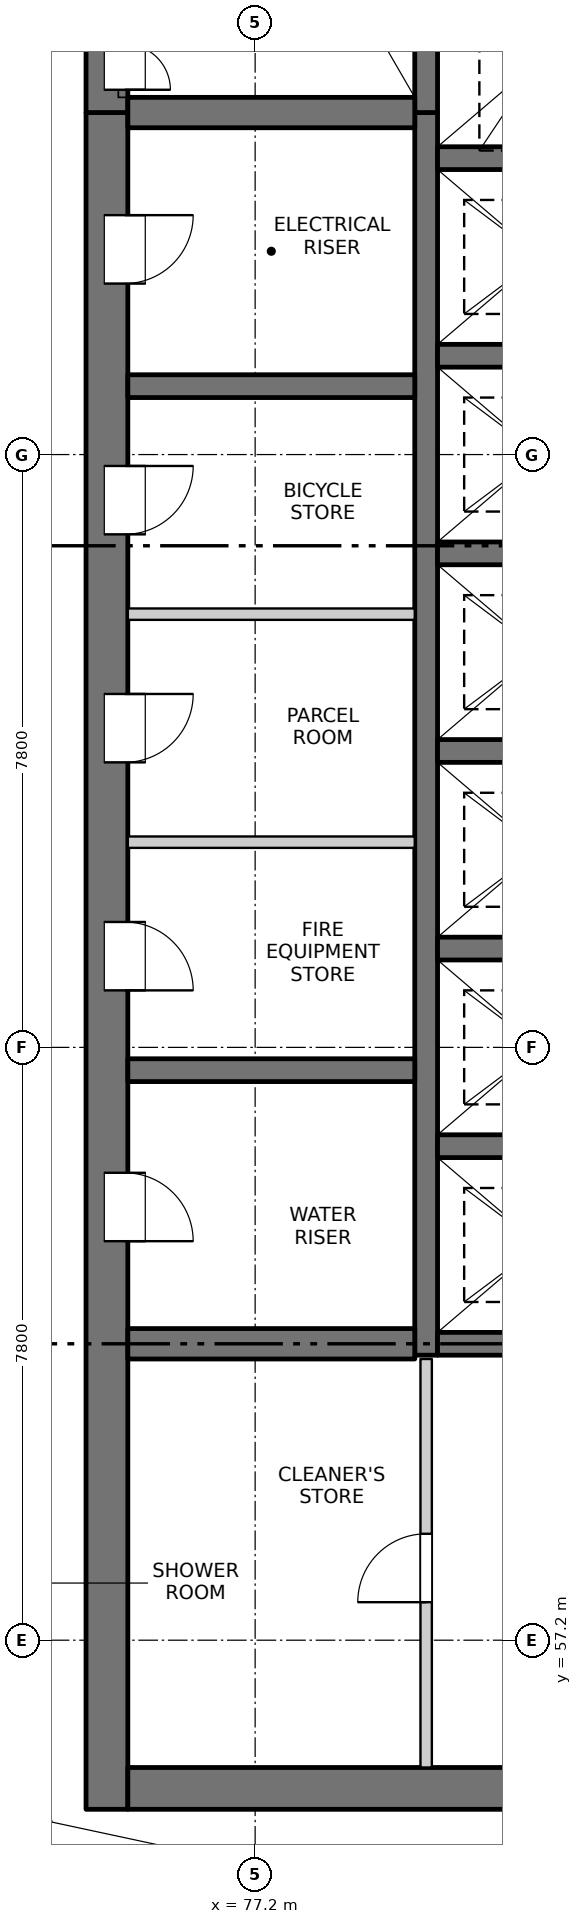
"""IFC4 building model, lengths in metres.
Left out: names, types, materials, properties, quantities, classifications, styles, units other than length and angle.
Written with IfcOpenShell. Run it as: python <this file> out.ifc"""

import sys

from ifc_helpers import new_model, si_unit, direction, frame, frame_2d, origin, place, context, subcontext, project, spatial, rectangle, extrude, element, fill, save


model = new_model("IFC4")
c1 = context("Model", 3, precision=1e-05, world=origin(), true_north=direction((0.0, 1.0)))
c2 = subcontext(c1, "Body", "Model", "MODEL_VIEW")
j1 = project(units=[si_unit("LENGTHUNIT", "METRE"), si_unit("PLANEANGLEUNIT", "RADIAN")], contexts=[c1])
p1 = place(None, origin())
s1 = spatial("IfcSite", under=j1, at=p1, CompositionType="ELEMENT")
p2 = place(p1, origin())
s2 = spatial("IfcBuilding", under=s1, at=p2, CompositionType="ELEMENT")
p3 = place(p2, frame((0.0, 0.0, 99.9)))
s3 = spatial("IfcBuildingStorey", under=s2, at=p3, CompositionType="ELEMENT", Elevation=99.9)
p4 = place(p3, frame((75.25, 54.975, -0.3), z_axis=(0.0, 0.0, 1.0), x_axis=(0.0, 1.0, 0.0)))
e1 = element("IfcWall", 1, at=p4, inside=s3, PredefinedType="SOLIDWALL", context=c2, shape_type="SweptSolid", body=[
    extrude(rectangle(XDim=22.325, YDim=0.55, at=frame_2d((11.163, 0.0))), origin(), (0.0, 0.0, 1.0), 3.45),
])
p5 = place(p4, frame((7.475, 0.0, 0.3)))
e2 = element("IfcOpeningElement", 2, at=p5, cuts=e1, PredefinedType="OPENING", context=c2, shape_type="SweptSolid", body=[
    extrude(rectangle(XDim=0.9, YDim=2.1, at=frame_2d((0.45, 1.05))), frame((0.0, 0.285, 0.0), z_axis=(0.0, -1.0, 0.0), x_axis=(1.0, 0.0, 0.0)), (0.0, 0.0, 1.0), 0.57),
])
p6 = place(p4, frame((10.775, 0.0, 0.3)))
e3 = element("IfcOpeningElement", 3, at=p6, cuts=e1, PredefinedType="OPENING", context=c2, shape_type="SweptSolid", body=[
    extrude(rectangle(XDim=0.9, YDim=2.1, at=frame_2d((0.45, 1.05))), frame((0.0, 0.285, 0.0), z_axis=(0.0, -1.0, 0.0), x_axis=(1.0, 0.0, 0.0)), (0.0, 0.0, 1.0), 0.57),
])
p7 = place(p4, frame((13.775, 0.0, 0.3)))
e4 = element("IfcOpeningElement", 4, at=p7, cuts=e1, PredefinedType="OPENING", context=c2, shape_type="SweptSolid", body=[
    extrude(rectangle(XDim=0.9, YDim=2.1, at=frame_2d((0.45, 1.05))), frame((0.0, 0.285, 0.0), z_axis=(0.0, -1.0, 0.0), x_axis=(1.0, 0.0, 0.0)), (0.0, 0.0, 1.0), 0.57),
])
p8 = place(p4, frame((16.775, 0.0, 0.3)))
e5 = element("IfcOpeningElement", 5, at=p8, cuts=e1, PredefinedType="OPENING", context=c2, shape_type="SweptSolid", body=[
    extrude(rectangle(XDim=0.9, YDim=2.1, at=frame_2d((0.45, 1.05))), frame((0.0, 0.285, 0.0), z_axis=(0.0, -1.0, 0.0), x_axis=(1.0, 0.0, 0.0)), (0.0, 0.0, 1.0), 0.57),
])
p9 = place(p4, frame((20.075, 0.0, 0.3)))
e6 = element("IfcOpeningElement", 6, at=p9, cuts=e1, PredefinedType="OPENING", context=c2, shape_type="SweptSolid", body=[
    extrude(rectangle(XDim=0.9, YDim=2.1, at=frame_2d((0.45, 1.05))), frame((0.0, 0.285, 0.0), z_axis=(0.0, -1.0, 0.0), x_axis=(1.0, 0.0, 0.0)), (0.0, 0.0, 1.0), 0.57),
])
p10 = place(p3, frame((75.25, 77.3, -0.3), z_axis=(0.0, 0.0, 1.0), x_axis=(0.0, 1.0, 0.0)))
e7 = element("IfcWall", 7, at=p10, inside=s3, PredefinedType="SOLIDWALL", context=c2, shape_type="SweptSolid", body=[
    extrude(rectangle(XDim=7.475, YDim=0.55, at=frame_2d((3.737, 0.0))), origin(), (0.0, 0.0, 1.0), 3.45),
])
p11 = place(p10, frame((0.3, 0.0, 0.3)))
e8 = element("IfcOpeningElement", 8, at=p11, cuts=e7, PredefinedType="OPENING", context=c2, shape_type="SweptSolid", body=[
    extrude(rectangle(XDim=1.2, YDim=2.1, at=frame_2d((0.6, 1.05))), frame((0.0, 0.285, 0.0), z_axis=(0.0, -1.0, 0.0), x_axis=(1.0, 0.0, 0.0)), (0.0, 0.0, 1.0), 0.57),
])
p12 = place(p3, frame((75.525, 55.25, -0.3), z_axis=(0.0, 0.0, 1.0), x_axis=(1.0, 0.0, 0.0)))
e9 = element("IfcWall", 9, at=p12, inside=s3, PredefinedType="SOLIDWALL", context=c2, shape_type="SweptSolid", body=[
    extrude(rectangle(XDim=18.95, YDim=0.55, at=frame_2d((9.475, 0.0))), origin(), (0.0, 0.0, 1.0), 3.45),
])
p13 = place(p12, frame((8.725, 0.0, 0.3)))
e10 = element("IfcOpeningElement", 10, at=p13, cuts=e9, PredefinedType="OPENING", context=c2, shape_type="SweptSolid", body=[
    extrude(rectangle(XDim=1.5, YDim=2.1, at=frame_2d((0.75, 1.05))), frame((0.0, 0.285, 0.0), z_axis=(0.0, -1.0, 0.0), x_axis=(1.0, 0.0, 0.0)), (0.0, 0.0, 1.0), 0.57),
])
p14 = place(p3, frame((79.45, 60.95, -0.3), z_axis=(0.0, 0.0, 1.0), x_axis=(0.0, 1.0, 0.0)))
e11 = element("IfcWall", 11, at=p14, inside=s3, PredefinedType="SOLIDWALL", context=c2, shape_type="SweptSolid", body=[
    extrude(rectangle(XDim=16.35, YDim=0.3, at=frame_2d((8.175, 0.0))), origin(), (0.0, 0.0, 1.0), 3.45),
])
p15 = place(p3, frame((79.45, 77.3, -0.3), z_axis=(0.0, 0.0, 1.0), x_axis=(0.0, 1.0, 0.0)))
e12 = element("IfcWall", 12, at=p15, inside=s3, PredefinedType="SOLIDWALL", context=c2, shape_type="SweptSolid", body=[
    extrude(rectangle(XDim=6.925, YDim=0.3, at=frame_2d((3.462, 0.0))), origin(), (0.0, 0.0, 1.0), 3.45),
])
for number, where, z_axis, x_axis in (
    (13, (79.6, 61.1, -0.3), (0.0, 0.0, 1.0), (1.0, 0.0, 0.0)),
    (14, (79.6, 63.7, -0.3), (0.0, 0.0, 1.0), (1.0, 0.0, 0.0)),
    (15, (79.6, 66.3, -0.3), (0.0, 0.0, 1.0), (1.0, 0.0, 0.0)),
    (16, (79.6, 68.9, -0.3), (0.0, 0.0, 1.0), (1.0, 0.0, 0.0)),
    (17, (79.6, 71.5, -0.3), (0.0, 0.0, 1.0), (1.0, 0.0, 0.0)),
    (18, (79.6, 74.1, -0.3), (0.0, 0.0, 1.0), (1.0, 0.0, 0.0)),
    (19, (79.6, 76.7, -0.3), (0.0, 0.0, 1.0), (1.0, 0.0, 0.0)),
):
    element("IfcWall", number, at=place(p3, frame(where, z_axis=z_axis, x_axis=x_axis)), inside=s3, PredefinedType="SOLIDWALL", context=c2, shape_type="SweptSolid", body=[
        extrude(rectangle(XDim=3.0, YDim=0.3, at=frame_2d((1.5, 0.0))), origin(), (0.0, 0.0, 1.0), 3.45),
    ])
p16 = place(p3, frame((75.525, 61.1, -0.3), z_axis=(0.0, 0.0, 1.0), x_axis=(1.0, 0.0, 0.0)))
e20 = element("IfcWall", 20, at=p16, inside=s3, PredefinedType="SOLIDWALL", context=c2, shape_type="SweptSolid", body=[
    extrude(rectangle(XDim=3.775, YDim=0.4, at=frame_2d((1.888, 0.0))), origin(), (0.0, 0.0, 1.0), 3.45),
])
for number, where, z_axis, x_axis in (
    (21, (75.525, 64.7, -0.3), (0.0, 0.0, 1.0), (1.0, 0.0, 0.0)),
    (22, (75.525, 73.7, -0.3), (0.0, 0.0, 1.0), (1.0, 0.0, 0.0)),
):
    element("IfcWall", number, at=place(p3, frame(where, z_axis=z_axis, x_axis=x_axis)), inside=s3, PredefinedType="SOLIDWALL", context=c2, shape_type="SweptSolid", body=[
        extrude(rectangle(XDim=3.775, YDim=0.3, at=frame_2d((1.888, 0.0))), origin(), (0.0, 0.0, 1.0), 3.45),
    ])
p17 = place(p3, frame((75.525, 77.3, -0.3), z_axis=(0.0, 0.0, 1.0), x_axis=(1.0, 0.0, 0.0)))
e23 = element("IfcWall", 23, at=p17, inside=s3, PredefinedType="SOLIDWALL", context=c2, shape_type="SweptSolid", body=[
    extrude(rectangle(XDim=3.775, YDim=0.4, at=frame_2d((1.888, 0.0))), origin(), (0.0, 0.0, 1.0), 3.45),
])
for number, where, z_axis, x_axis in (
    (24, (75.525, 67.7, 0.0), (0.0, 0.0, 1.0), (1.0, 0.0, 0.0)),
    (25, (75.525, 70.7, 0.0), (0.0, 0.0, 1.0), (1.0, 0.0, 0.0)),
):
    element("IfcWall", number, at=place(p3, frame(where, z_axis=z_axis, x_axis=x_axis)), inside=s3, PredefinedType="PARTITIONING", context=c2, shape_type="SweptSolid", body=[
        extrude(rectangle(XDim=3.775, YDim=0.15, at=frame_2d((1.887, 0.0))), origin(), (0.0, 0.0, 1.0), 3.15),
    ])
p18 = place(p3, frame((79.45, 55.525, 0.0), z_axis=(0.0, 0.0, 1.0), x_axis=(0.0, 1.0, 0.0)))
e26 = element("IfcWall", 26, at=p18, inside=s3, PredefinedType="PARTITIONING", context=c2, shape_type="SweptSolid", body=[
    extrude(rectangle(XDim=5.375, YDim=0.15, at=frame_2d((2.688, 0.0))), origin(), (0.0, 0.0, 1.0), 3.15),
])
p19 = place(p18, frame((2.175, 0.0, 0.0)))
e27 = element("IfcOpeningElement", 27, at=p19, cuts=e26, PredefinedType="OPENING", context=c2, shape_type="SweptSolid", body=[
    extrude(rectangle(XDim=0.9, YDim=2.1, at=frame_2d((0.45, 1.05))), frame((0.0, 0.085, 0.0), z_axis=(0.0, -1.0, 0.0), x_axis=(1.0, 0.0, 0.0)), (0.0, 0.0, 1.0), 0.17),
])
p20 = place(p19, origin())
e28 = element("IfcDoor", 28, at=p20, inside=s3, OperationType="SINGLE_SWING_LEFT", PredefinedType="DOOR", context=c2, shape_type="SweptSolid", body=[
    extrude(rectangle(XDim=0.9, YDim=2.1, at=frame_2d((0.45, 1.05))), frame((0.0, 0.025, 0.0), z_axis=(0.0, -1.0, 0.0), x_axis=(1.0, 0.0, 0.0)), (0.0, 0.0, 1.0), 0.05),
])
fill(e27, e28)
p21 = place(p5, origin())
e29 = element("IfcDoor", 29, at=p21, inside=s3, OperationType="SINGLE_SWING_RIGHT", PredefinedType="DOOR", context=c2, shape_type="SweptSolid", body=[
    extrude(rectangle(XDim=0.9, YDim=2.1, at=frame_2d((0.45, 1.05))), frame((0.0, -0.21, 0.0), z_axis=(0.0, -1.0, 0.0), x_axis=(1.0, 0.0, 0.0)), (0.0, 0.0, 1.0), 0.05),
])
fill(e2, e29)
p22 = place(p6, origin())
e30 = element("IfcDoor", 30, at=p22, inside=s3, OperationType="SINGLE_SWING_RIGHT", PredefinedType="DOOR", context=c2, shape_type="SweptSolid", body=[
    extrude(rectangle(XDim=0.9, YDim=2.1, at=frame_2d((0.45, 1.05))), frame((0.0, -0.21, 0.0), z_axis=(0.0, -1.0, 0.0), x_axis=(1.0, 0.0, 0.0)), (0.0, 0.0, 1.0), 0.05),
])
fill(e3, e30)
p23 = place(p7, origin())
e31 = element("IfcDoor", 31, at=p23, inside=s3, OperationType="SINGLE_SWING_LEFT", PredefinedType="DOOR", context=c2, shape_type="SweptSolid", body=[
    extrude(rectangle(XDim=0.9, YDim=2.1, at=frame_2d((0.45, 1.05))), frame((0.0, -0.21, 0.0), z_axis=(0.0, -1.0, 0.0), x_axis=(1.0, 0.0, 0.0)), (0.0, 0.0, 1.0), 0.05),
])
fill(e4, e31)
p24 = place(p8, origin())
e32 = element("IfcDoor", 32, at=p24, inside=s3, OperationType="SINGLE_SWING_LEFT", PredefinedType="DOOR", context=c2, shape_type="SweptSolid", body=[
    extrude(rectangle(XDim=0.9, YDim=2.1, at=frame_2d((0.45, 1.05))), frame((0.0, -0.21, 0.0), z_axis=(0.0, -1.0, 0.0), x_axis=(1.0, 0.0, 0.0)), (0.0, 0.0, 1.0), 0.05),
])
fill(e5, e32)
p25 = place(p9, origin())
e33 = element("IfcDoor", 33, at=p25, inside=s3, OperationType="SINGLE_SWING_LEFT", PredefinedType="DOOR", context=c2, shape_type="SweptSolid", body=[
    extrude(rectangle(XDim=0.9, YDim=2.1, at=frame_2d((0.45, 1.05))), frame((0.0, -0.21, 0.0), z_axis=(0.0, -1.0, 0.0), x_axis=(1.0, 0.0, 0.0)), (0.0, 0.0, 1.0), 0.05),
])
fill(e6, e33)
p26 = place(p11, origin())
e34 = element("IfcDoor", 34, at=p26, inside=s3, OperationType="DOUBLE_DOOR_SINGLE_SWING", PredefinedType="DOOR", context=c2, shape_type="SweptSolid", body=[
    extrude(rectangle(XDim=1.2, YDim=2.1, at=frame_2d((0.6, 1.05))), frame((0.0, -0.21, 0.0), z_axis=(0.0, -1.0, 0.0), x_axis=(1.0, 0.0, 0.0)), (0.0, 0.0, 1.0), 0.05),
])
fill(e8, e34)
save(model, sys.argv[1])
